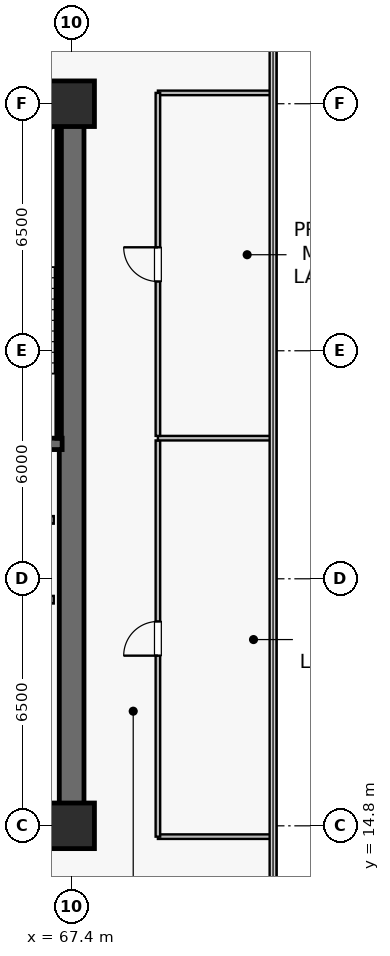
"""IFC4 building model, lengths in metres.
Left out: names, types, materials, properties, quantities, classifications, styles, units other than length and angle.
Written with IfcOpenShell. Run it as: python <this file> out.ifc"""

import sys

from ifc_helpers import new_model, si_unit, direction, frame, frame_2d, origin, origin_2d, place, context, subcontext, project, spatial, rectangle, extrude, source, transform, mapped, element, fill, save


model = new_model("IFC4")
c1 = context("Model", 3, precision=1e-05, world=origin(), true_north=direction((0.0, 1.0)))
c2 = subcontext(c1, "Body", "Model", "MODEL_VIEW")
j1 = project(units=[si_unit("LENGTHUNIT", "METRE"), si_unit("PLANEANGLEUNIT", "RADIAN")], contexts=[c1])
p1 = place(None, origin())
s1 = spatial("IfcSite", under=j1, at=p1, CompositionType="ELEMENT")
p2 = place(p1, origin())
s2 = spatial("IfcBuilding", under=s1, at=p2, CompositionType="ELEMENT")
p3 = place(p2, frame((0.0, 0.0, 109.2)))
s3 = spatial("IfcBuildingStorey", under=s2, at=p3, CompositionType="ELEMENT", Elevation=109.2)
p4 = place(p3, frame((52.275, 14.8, 0.0), z_axis=(0.0, 0.0, 1.0), x_axis=(1.0, 0.0, 0.0)))
e1 = element("IfcWall", 1, at=p4, inside=s3, PredefinedType="SHEAR", context=c2, shape_type="SweptSolid", body=[
    extrude(rectangle(XDim=15.45, YDim=0.65, at=frame_2d((7.725, 0.0))), origin(), (0.0, 0.0, 1.0), 3.79),
])
p5 = place(p3, frame((52.275, 33.8, 0.0), z_axis=(0.0, 0.0, 1.0), x_axis=(1.0, 0.0, 0.0)))
e2 = element("IfcWall", 2, at=p5, inside=s3, PredefinedType="SHEAR", context=c2, shape_type="SweptSolid", body=[
    extrude(rectangle(XDim=15.45, YDim=0.65, at=frame_2d((7.725, 0.0))), origin(), (0.0, 0.0, 1.0), 3.79),
])
p6 = place(p5, frame((6.125, 0.0, 0.0)))
e3 = element("IfcOpeningElement", 3, at=p6, cuts=e2, PredefinedType="OPENING", context=c2, shape_type="SweptSolid", body=[
    extrude(rectangle(XDim=0.95, YDim=2.15, at=frame_2d((0.475, 1.075))), frame((0.0, 0.335, 0.0), z_axis=(0.0, -1.0, 0.0), x_axis=(1.0, 0.0, 0.0)), (0.0, 0.0, 1.0), 0.67),
])
p7 = place(p5, frame((2.585, 0.0, 0.0)))
e4 = element("IfcOpeningElement", 4, at=p7, cuts=e2, PredefinedType="OPENING", context=c2, shape_type="SweptSolid", body=[
    extrude(rectangle(XDim=0.95, YDim=2.15, at=frame_2d((0.475, 1.075))), frame((0.0, 0.335, 0.0), z_axis=(0.0, -1.0, 0.0), x_axis=(1.0, 0.0, 0.0)), (0.0, 0.0, 1.0), 0.67),
])
p8 = place(p3, frame((67.4, 15.125, 0.0), z_axis=(0.0, 0.0, 1.0), x_axis=(0.0, 1.0, 0.0)))
e5 = element("IfcWall", 5, at=p8, inside=s3, PredefinedType="SHEAR", context=c2, shape_type="SweptSolid", body=[
    extrude(rectangle(XDim=18.35, YDim=0.65, at=frame_2d((9.175, 0.0))), origin(), (0.0, 0.0, 1.0), 3.79),
])
p9 = place(p3, frame((63.35, 24.85, 0.0), z_axis=(0.0, 0.0, 1.0), x_axis=(1.0, 0.0, 0.0)))
e6 = element("IfcWall", 6, at=p9, inside=s3, PredefinedType="SHEAR", context=c2, shape_type="SweptSolid", body=[
    extrude(rectangle(XDim=3.8, YDim=0.3, at=frame_2d((1.9, 0.0))), origin(), (0.0, 0.0, 1.0), 3.79),
])
p10 = place(p3, frame((63.35, 33.4, 0.0), z_axis=(0.0, 0.0, 1.0), x_axis=(1.0, 0.0, 0.0)))
e7 = element("IfcWall", 7, at=p10, inside=s3, PredefinedType="SOLIDWALL", context=c2, shape_type="SweptSolid", body=[
    extrude(rectangle(XDim=3.72, YDim=0.12, at=frame_2d((1.86, 0.0))), origin(), (0.0, 0.0, 1.0), 3.79),
])
p11 = place(p3, frame((67.07, 25.0, 0.0), z_axis=(0.0, 0.0, 1.0), x_axis=(0.0, 1.0, 0.0)))
e8 = element("IfcWall", 8, at=p11, inside=s3, PredefinedType="SOLIDWALL", context=c2, shape_type="SweptSolid", body=[
    extrude(rectangle(XDim=8.32, YDim=0.12, at=frame_2d((4.16, 0.0))), origin(), (0.0, 0.0, 1.0), 3.79),
])
m1 = source(origin(), c2, "Body", "SweptSolid", [
    extrude(rectangle(XDim=1.2, YDim=1.2, at=origin_2d()), origin(), (0.0, 0.0, 1.0), 4.1),
])
for number, where, z_axis, x_axis in (
    (9, (67.4, 14.8, 0.0), (0.0, 0.0, 1.0), (1.0, 0.0, 0.0)),
    (10, (67.4, 33.8, 0.0), (0.0, 0.0, 1.0), (1.0, 0.0, 0.0)),
):
    element("IfcColumn", number, at=place(p3, frame(where, z_axis=z_axis, x_axis=x_axis)), inside=s3, PredefinedType="COLUMN", context=c2, shape_type="MappedRepresentation", body=[
        mapped(m1, transform((0.0, 0.0, 0.0), scale=1.0)),
    ])
for number, where, z_axis, x_axis in (
    (11, (64.67, 20.75, 0.0), (0.0, 0.0, 1.0), (1.0, 0.0, 0.0)),
    (12, (64.67, 22.85, 0.0), (0.0, 0.0, 1.0), (1.0, 0.0, 0.0)),
):
    element("IfcWall", number, at=place(p3, frame(where, z_axis=z_axis, x_axis=x_axis)), inside=s3, PredefinedType="SOLIDWALL", context=c2, shape_type="SweptSolid", body=[
        extrude(rectangle(XDim=2.26, YDim=0.2, at=frame_2d((1.13, 0.0))), origin(), (0.0, 0.0, 1.0), 3.79),
    ])
for number, where, z_axis, x_axis in (
    (13, (69.67, 14.515, 0.0), (0.0, 0.0, 1.0), (1.0, 0.0, 0.0)),
    (14, (69.67, 34.085, 0.0), (0.0, 0.0, 1.0), (1.0, 0.0, 0.0)),
):
    element("IfcWall", number, at=place(p3, frame(where, z_axis=z_axis, x_axis=x_axis)), inside=s3, PredefinedType="PARTITIONING", context=c2, shape_type="SweptSolid", body=[
        extrude(rectangle(XDim=3.02, YDim=0.12, at=frame_2d((1.51, 0.0))), origin(), (0.0, 0.0, 1.0), 3.79),
    ])
p12 = place(p3, frame((69.67, 14.515, 0.0), z_axis=(0.0, 0.0, 1.0), x_axis=(0.0, 1.0, 0.0)))
e15 = element("IfcWall", 15, at=p12, inside=s3, PredefinedType="PARTITIONING", context=c2, shape_type="SweptSolid", body=[
    extrude(rectangle(XDim=10.425, YDim=0.12, at=frame_2d((5.212, 0.0))), origin(), (0.0, 0.0, 1.0), 3.79),
])
p13 = place(p12, frame((4.762, 0.0, 0.0)))
e16 = element("IfcOpeningElement", 16, at=p13, cuts=e15, PredefinedType="OPENING", context=c2, shape_type="SweptSolid", body=[
    extrude(rectangle(XDim=0.9, YDim=2.1, at=frame_2d((0.45, 1.05))), frame((0.0, 0.07, 0.0), z_axis=(0.0, -1.0, 0.0), x_axis=(1.0, 0.0, 0.0)), (0.0, 0.0, 1.0), 0.14),
])
p14 = place(p3, frame((69.67, 25.0, 0.0), z_axis=(0.0, 0.0, 1.0), x_axis=(1.0, 0.0, 0.0)))
e17 = element("IfcWall", 17, at=p14, inside=s3, PredefinedType="PARTITIONING", context=c2, shape_type="SweptSolid", body=[
    extrude(rectangle(XDim=3.02, YDim=0.12, at=frame_2d((1.51, 0.0))), origin(), (0.0, 0.0, 1.0), 3.79),
])
p15 = place(p3, frame((69.67, 25.06, 0.0), z_axis=(0.0, 0.0, 1.0), x_axis=(0.0, 1.0, 0.0)))
e18 = element("IfcWall", 18, at=p15, inside=s3, PredefinedType="PARTITIONING", context=c2, shape_type="SweptSolid", body=[
    extrude(rectangle(XDim=9.025, YDim=0.12, at=frame_2d((4.512, 0.0))), origin(), (0.0, 0.0, 1.0), 3.79),
])
p16 = place(p15, frame((4.062, 0.0, 0.0)))
e19 = element("IfcOpeningElement", 19, at=p16, cuts=e18, PredefinedType="OPENING", context=c2, shape_type="SweptSolid", body=[
    extrude(rectangle(XDim=0.9, YDim=2.1, at=frame_2d((0.45, 1.05))), frame((0.0, 0.07, 0.0), z_axis=(0.0, -1.0, 0.0), x_axis=(1.0, 0.0, 0.0)), (0.0, 0.0, 1.0), 0.14),
])
m2 = source(origin(), c2, "Body", "SweptSolid", [
    extrude(rectangle(XDim=0.9, YDim=2.1, at=frame_2d((0.45, 1.05))), frame((0.0, 0.025, 0.0), z_axis=(0.0, -1.0, 0.0), x_axis=(1.0, 0.0, 0.0)), (0.0, 0.0, 1.0), 0.05),
])
p17 = place(p13, origin())
e20 = element("IfcDoor", 20, at=p17, inside=s3, OperationType="SINGLE_SWING_LEFT", PredefinedType="DOOR", context=c2, shape_type="MappedRepresentation", body=[
    mapped(m2, transform((0.0, 0.0, 0.0), scale=1.0)),
])
fill(e16, e20)
p18 = place(p16, origin())
e21 = element("IfcDoor", 21, at=p18, inside=s3, OperationType="SINGLE_SWING_RIGHT", PredefinedType="DOOR", context=c2, shape_type="MappedRepresentation", body=[
    mapped(m2, transform((0.0, 0.0, 0.0), scale=1.0)),
])
fill(e19, e21)
save(model, sys.argv[1])
